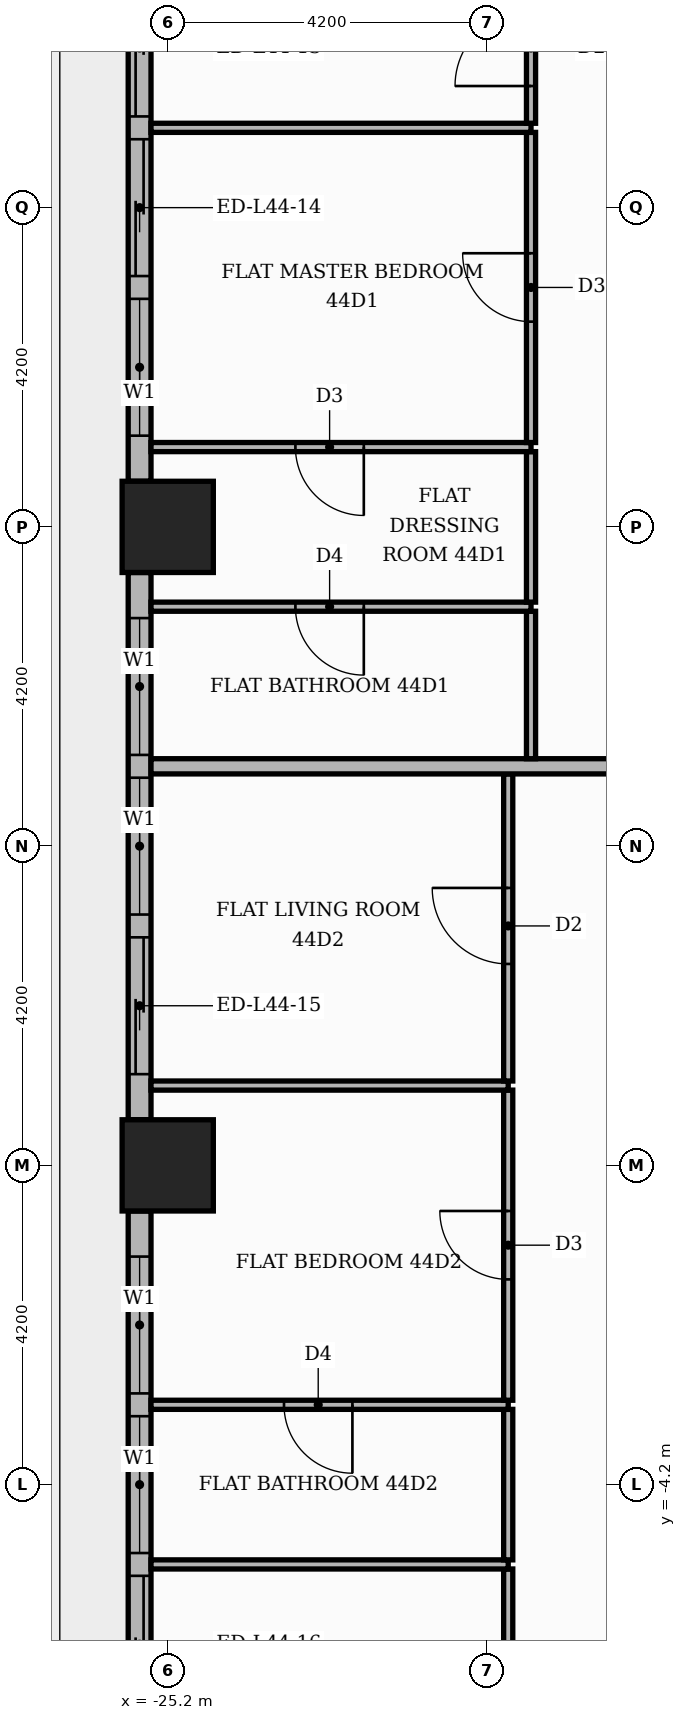
"""IFC4 building model, lengths in metres.
Left out: names, types, materials, properties, quantities, classifications, styles, units other than length and angle.
Written with IfcOpenShell. Run it as: python <this file> out.ifc"""

import sys

from ifc_helpers import new_model, si_unit, direction, frame, frame_2d, origin, origin_2d, place, context, subcontext, project, spatial, rectangle, extrude, element, fill, save


model = new_model("IFC4")
c1 = context("Model", 3, precision=1e-05, world=origin(), true_north=direction((0.0, 1.0)))
c2 = subcontext(c1, "Body", "Model", "MODEL_VIEW")
j1 = project(units=[si_unit("LENGTHUNIT", "METRE"), si_unit("PLANEANGLEUNIT", "RADIAN")], contexts=[c1])
p1 = place(None, origin())
s1 = spatial("IfcSite", under=j1, at=p1, CompositionType="ELEMENT")
p2 = place(p1, origin())
s2 = spatial("IfcBuilding", under=s1, at=p2, CompositionType="ELEMENT")
p3 = place(p2, frame((0.0, 0.0, 188.4)))
s3 = spatial("IfcBuildingStorey", under=s2, at=p3, CompositionType="ELEMENT", Elevation=188.4)
for number, where, z_axis, x_axis in (
    (1, (-25.2, 0.0, 0.0), (0.0, 0.0, 1.0), (1.0, 0.0, 0.0)),
    (2, (-25.2, 8.4, 0.0), (0.0, 0.0, 1.0), (1.0, 0.0, 0.0)),
):
    element("IfcColumn", number, at=place(p3, frame(where, z_axis=z_axis, x_axis=x_axis)), inside=s3, PredefinedType="COLUMN", context=c2, shape_type="SweptSolid", body=[
        extrude(rectangle(XDim=1.2, YDim=1.2, at=origin_2d()), origin(), (0.0, 0.0, 1.0), 3.9),
    ])
p4 = place(p3, frame((-25.57, 16.2, 0.0), z_axis=(0.0, 0.0, 1.0), x_axis=(0.0, -1.0, 0.0)))
e3 = element("IfcWall", 3, at=p4, inside=s3, PredefinedType="STANDARD", context=c2, shape_type="SweptSolid", body=[
    extrude(rectangle(XDim=7.2, YDim=0.3, at=frame_2d((3.6, 0.0))), origin(), (0.0, 0.0, 1.0), 3.48),
])
p5 = place(p4, frame((0.6, 0.0, 0.0)))
e4 = element("IfcOpeningElement", 4, at=p5, cuts=e3, PredefinedType="OPENING", context=c2, shape_type="SweptSolid", body=[
    extrude(rectangle(XDim=1.8, YDim=2.4, at=frame_2d((0.9, 1.2))), frame((0.0, 0.16, 0.0), z_axis=(0.0, -1.0, 0.0), x_axis=(1.0, 0.0, 0.0)), (0.0, 0.0, 1.0), 0.32),
])
p6 = place(p4, frame((2.7, 0.0, 0.0)))
e5 = element("IfcOpeningElement", 5, at=p6, cuts=e3, PredefinedType="OPENING", context=c2, shape_type="SweptSolid", body=[
    extrude(rectangle(XDim=1.8, YDim=2.4, at=frame_2d((0.9, 1.2))), frame((0.0, 0.16, 0.0), z_axis=(0.0, -1.0, 0.0), x_axis=(1.0, 0.0, 0.0)), (0.0, 0.0, 1.0), 0.32),
])
p7 = place(p4, frame((4.8, 0.0, 0.9)))
e6 = element("IfcOpeningElement", 6, at=p7, cuts=e3, PredefinedType="OPENING", context=c2, shape_type="SweptSolid", body=[
    extrude(rectangle(XDim=1.8, YDim=2.1, at=frame_2d((0.9, 1.05))), frame((0.0, 0.16, 0.0), z_axis=(0.0, -1.0, 0.0), x_axis=(1.0, 0.0, 0.0)), (0.0, 0.0, 1.0), 0.32),
])
p8 = place(p3, frame((-25.57, 7.8, 0.0), z_axis=(0.0, 0.0, 1.0), x_axis=(0.0, -1.0, 0.0)))
e7 = element("IfcWall", 7, at=p8, inside=s3, PredefinedType="STANDARD", context=c2, shape_type="SweptSolid", body=[
    extrude(rectangle(XDim=7.2, YDim=0.3, at=frame_2d((3.6, 0.0))), origin(), (0.0, 0.0, 1.0), 3.48),
])
p9 = place(p8, frame((0.6, 0.0, 0.9)))
e8 = element("IfcOpeningElement", 8, at=p9, cuts=e7, PredefinedType="OPENING", context=c2, shape_type="SweptSolid", body=[
    extrude(rectangle(XDim=1.8, YDim=2.1, at=frame_2d((0.9, 1.05))), frame((0.0, 0.16, 0.0), z_axis=(0.0, -1.0, 0.0), x_axis=(1.0, 0.0, 0.0)), (0.0, 0.0, 1.0), 0.32),
])
p10 = place(p8, frame((2.7, 0.0, 0.9)))
e9 = element("IfcOpeningElement", 9, at=p10, cuts=e7, PredefinedType="OPENING", context=c2, shape_type="SweptSolid", body=[
    extrude(rectangle(XDim=1.8, YDim=2.1, at=frame_2d((0.9, 1.05))), frame((0.0, 0.16, 0.0), z_axis=(0.0, -1.0, 0.0), x_axis=(1.0, 0.0, 0.0)), (0.0, 0.0, 1.0), 0.32),
])
p11 = place(p8, frame((4.8, 0.0, 0.0)))
e10 = element("IfcOpeningElement", 10, at=p11, cuts=e7, PredefinedType="OPENING", context=c2, shape_type="SweptSolid", body=[
    extrude(rectangle(XDim=1.8, YDim=2.4, at=frame_2d((0.9, 1.2))), frame((0.0, 0.16, 0.0), z_axis=(0.0, -1.0, 0.0), x_axis=(1.0, 0.0, 0.0)), (0.0, 0.0, 1.0), 0.32),
])
p12 = place(p3, frame((-25.57, -0.6, 0.0), z_axis=(0.0, 0.0, 1.0), x_axis=(0.0, -1.0, 0.0)))
e11 = element("IfcWall", 11, at=p12, inside=s3, PredefinedType="STANDARD", context=c2, shape_type="SweptSolid", body=[
    extrude(rectangle(XDim=7.2, YDim=0.3, at=frame_2d((3.6, 0.0))), origin(), (0.0, 0.0, 1.0), 3.48),
])
p13 = place(p12, frame((0.6, 0.0, 0.9)))
e12 = element("IfcOpeningElement", 12, at=p13, cuts=e11, PredefinedType="OPENING", context=c2, shape_type="SweptSolid", body=[
    extrude(rectangle(XDim=1.8, YDim=2.1, at=frame_2d((0.9, 1.05))), frame((0.0, 0.16, 0.0), z_axis=(0.0, -1.0, 0.0), x_axis=(1.0, 0.0, 0.0)), (0.0, 0.0, 1.0), 0.32),
])
p14 = place(p12, frame((2.7, 0.0, 0.9)))
e13 = element("IfcOpeningElement", 13, at=p14, cuts=e11, PredefinedType="OPENING", context=c2, shape_type="SweptSolid", body=[
    extrude(rectangle(XDim=1.8, YDim=2.1, at=frame_2d((0.9, 1.05))), frame((0.0, 0.16, 0.0), z_axis=(0.0, -1.0, 0.0), x_axis=(1.0, 0.0, 0.0)), (0.0, 0.0, 1.0), 0.32),
])
p15 = place(p12, frame((4.8, 0.0, 0.0)))
e14 = element("IfcOpeningElement", 14, at=p15, cuts=e11, PredefinedType="OPENING", context=c2, shape_type="SweptSolid", body=[
    extrude(rectangle(XDim=1.8, YDim=2.4, at=frame_2d((0.9, 1.2))), frame((0.0, 0.16, 0.0), z_axis=(0.0, -1.0, 0.0), x_axis=(1.0, 0.0, 0.0)), (0.0, 0.0, 1.0), 0.32),
])
p16 = place(p3, frame((-20.72, -9.39, 0.0), z_axis=(0.0, 0.0, 1.0), x_axis=(0.0, 1.0, 0.0)))
e15 = element("IfcWall", 15, at=p16, inside=s3, PredefinedType="PARTITIONING", context=c2, shape_type="SweptSolid", body=[
    extrude(rectangle(XDim=4.08, YDim=0.12, at=frame_2d((2.04, 0.0))), origin(), (0.0, 0.0, 1.0), 3.48),
])
p17 = place(p16, frame((1.59, 0.0, 0.0)))
e16 = element("IfcOpeningElement", 16, at=p17, cuts=e15, PredefinedType="OPENING", context=c2, shape_type="SweptSolid", body=[
    extrude(rectangle(XDim=0.9, YDim=2.1, at=frame_2d((0.45, 1.05))), frame((0.0, 0.07, 0.0), z_axis=(0.0, -1.0, 0.0), x_axis=(1.0, 0.0, 0.0)), (0.0, 0.0, 1.0), 0.14),
])
p18 = place(p3, frame((-25.42, -5.25, 0.0), z_axis=(0.0, 0.0, 1.0), x_axis=(1.0, 0.0, 0.0)))
e17 = element("IfcWall", 17, at=p18, inside=s3, PredefinedType="PARTITIONING", context=c2, shape_type="SweptSolid", body=[
    extrude(rectangle(XDim=4.7, YDim=0.12, at=frame_2d((2.35, 0.0))), origin(), (0.0, 0.0, 1.0), 3.48),
])
p19 = place(p3, frame((-20.72, -5.19, 0.0), z_axis=(0.0, 0.0, 1.0), x_axis=(0.0, 1.0, 0.0)))
e18 = element("IfcWall", 18, at=p19, inside=s3, PredefinedType="PARTITIONING", context=c2, shape_type="SweptSolid", body=[
    extrude(rectangle(XDim=1.98, YDim=0.12, at=frame_2d((0.99, 0.0))), origin(), (0.0, 0.0, 1.0), 3.48),
])
p20 = place(p3, frame((-25.42, -3.15, 0.0), z_axis=(0.0, 0.0, 1.0), x_axis=(1.0, 0.0, 0.0)))
e19 = element("IfcWall", 19, at=p20, inside=s3, PredefinedType="PARTITIONING", context=c2, shape_type="SweptSolid", body=[
    extrude(rectangle(XDim=4.7, YDim=0.12, at=frame_2d((2.35, 0.0))), origin(), (0.0, 0.0, 1.0), 3.48),
])
p21 = place(p20, frame((1.75, 0.0, 0.0)))
e20 = element("IfcOpeningElement", 20, at=p21, cuts=e19, PredefinedType="OPENING", context=c2, shape_type="SweptSolid", body=[
    extrude(rectangle(XDim=0.9, YDim=2.1, at=frame_2d((0.45, 1.05))), frame((0.0, 0.07, 0.0), z_axis=(0.0, -1.0, 0.0), x_axis=(1.0, 0.0, 0.0)), (0.0, 0.0, 1.0), 0.14),
])
p22 = place(p3, frame((-20.72, -3.09, 0.0), z_axis=(0.0, 0.0, 1.0), x_axis=(0.0, 1.0, 0.0)))
e21 = element("IfcWall", 21, at=p22, inside=s3, PredefinedType="PARTITIONING", context=c2, shape_type="SweptSolid", body=[
    extrude(rectangle(XDim=4.08, YDim=0.12, at=frame_2d((2.04, 0.0))), origin(), (0.0, 0.0, 1.0), 3.48),
])
p23 = place(p22, frame((1.59, 0.0, 0.0)))
e22 = element("IfcOpeningElement", 22, at=p23, cuts=e21, PredefinedType="OPENING", context=c2, shape_type="SweptSolid", body=[
    extrude(rectangle(XDim=0.9, YDim=2.1, at=frame_2d((0.45, 1.05))), frame((0.0, 0.07, 0.0), z_axis=(0.0, -1.0, 0.0), x_axis=(1.0, 0.0, 0.0)), (0.0, 0.0, 1.0), 0.14),
])
p24 = place(p3, frame((-25.42, 1.05, 0.0), z_axis=(0.0, 0.0, 1.0), x_axis=(1.0, 0.0, 0.0)))
e23 = element("IfcWall", 23, at=p24, inside=s3, PredefinedType="PARTITIONING", context=c2, shape_type="SweptSolid", body=[
    extrude(rectangle(XDim=4.7, YDim=0.12, at=frame_2d((2.35, 0.0))), origin(), (0.0, 0.0, 1.0), 3.48),
])
p25 = place(p3, frame((-20.72, 1.11, 0.0), z_axis=(0.0, 0.0, 1.0), x_axis=(0.0, 1.0, 0.0)))
e24 = element("IfcWall", 24, at=p25, inside=s3, PredefinedType="PARTITIONING", context=c2, shape_type="SweptSolid", body=[
    extrude(rectangle(XDim=4.04, YDim=0.12, at=frame_2d((2.02, 0.0))), origin(), (0.0, 0.0, 1.0), 3.48),
])
p26 = place(p25, frame((1.54, 0.0, 0.0)))
e25 = element("IfcOpeningElement", 25, at=p26, cuts=e24, PredefinedType="OPENING", context=c2, shape_type="SweptSolid", body=[
    extrude(rectangle(XDim=1.0, YDim=2.1, at=frame_2d((0.5, 1.05))), frame((0.0, 0.07, 0.0), z_axis=(0.0, -1.0, 0.0), x_axis=(1.0, 0.0, 0.0)), (0.0, 0.0, 1.0), 0.14),
])
p27 = place(p3, frame((-25.42, 5.25, 0.0), z_axis=(0.0, 0.0, 1.0), x_axis=(1.0, 0.0, 0.0)))
e26 = element("IfcWall", 26, at=p27, inside=s3, PredefinedType="PARTITIONING", context=c2, shape_type="SweptSolid", body=[
    extrude(rectangle(XDim=11.77, YDim=0.2, at=frame_2d((5.885, 0.0))), origin(), (0.0, 0.0, 1.0), 3.48),
])
p28 = place(p3, frame((-20.42, 5.35, 0.0), z_axis=(0.0, 0.0, 1.0), x_axis=(0.0, 1.0, 0.0)))
e27 = element("IfcWall", 27, at=p28, inside=s3, PredefinedType="PARTITIONING", context=c2, shape_type="SweptSolid", body=[
    extrude(rectangle(XDim=1.94, YDim=0.12, at=frame_2d((0.97, 0.0))), origin(), (0.0, 0.0, 1.0), 3.48),
])
p29 = place(p3, frame((-25.42, 7.35, 0.0), z_axis=(0.0, 0.0, 1.0), x_axis=(1.0, 0.0, 0.0)))
e28 = element("IfcWall", 28, at=p29, inside=s3, PredefinedType="PARTITIONING", context=c2, shape_type="SweptSolid", body=[
    extrude(rectangle(XDim=5.0, YDim=0.12, at=frame_2d((2.5, 0.0))), origin(), (0.0, 0.0, 1.0), 3.48),
])
p30 = place(p29, frame((1.9, 0.0, 0.0)))
e29 = element("IfcOpeningElement", 29, at=p30, cuts=e28, PredefinedType="OPENING", context=c2, shape_type="SweptSolid", body=[
    extrude(rectangle(XDim=0.9, YDim=2.1, at=frame_2d((0.45, 1.05))), frame((0.0, 0.07, 0.0), z_axis=(0.0, -1.0, 0.0), x_axis=(1.0, 0.0, 0.0)), (0.0, 0.0, 1.0), 0.14),
])
p31 = place(p3, frame((-20.42, 7.41, 0.0), z_axis=(0.0, 0.0, 1.0), x_axis=(0.0, 1.0, 0.0)))
e30 = element("IfcWall", 30, at=p31, inside=s3, PredefinedType="PARTITIONING", context=c2, shape_type="SweptSolid", body=[
    extrude(rectangle(XDim=1.98, YDim=0.12, at=frame_2d((0.99, 0.0))), origin(), (0.0, 0.0, 1.0), 3.48),
])
p32 = place(p3, frame((-25.42, 9.45, 0.0), z_axis=(0.0, 0.0, 1.0), x_axis=(1.0, 0.0, 0.0)))
e31 = element("IfcWall", 31, at=p32, inside=s3, PredefinedType="PARTITIONING", context=c2, shape_type="SweptSolid", body=[
    extrude(rectangle(XDim=5.0, YDim=0.12, at=frame_2d((2.5, 0.0))), origin(), (0.0, 0.0, 1.0), 3.48),
])
p33 = place(p32, frame((1.9, 0.0, 0.0)))
e32 = element("IfcOpeningElement", 32, at=p33, cuts=e31, PredefinedType="OPENING", context=c2, shape_type="SweptSolid", body=[
    extrude(rectangle(XDim=0.9, YDim=2.1, at=frame_2d((0.45, 1.05))), frame((0.0, 0.07, 0.0), z_axis=(0.0, -1.0, 0.0), x_axis=(1.0, 0.0, 0.0)), (0.0, 0.0, 1.0), 0.14),
])
p34 = place(p3, frame((-20.42, 9.51, 0.0), z_axis=(0.0, 0.0, 1.0), x_axis=(0.0, 1.0, 0.0)))
e33 = element("IfcWall", 33, at=p34, inside=s3, PredefinedType="PARTITIONING", context=c2, shape_type="SweptSolid", body=[
    extrude(rectangle(XDim=4.08, YDim=0.12, at=frame_2d((2.04, 0.0))), origin(), (0.0, 0.0, 1.0), 3.48),
])
p35 = place(p34, frame((1.59, 0.0, 0.0)))
e34 = element("IfcOpeningElement", 34, at=p35, cuts=e33, PredefinedType="OPENING", context=c2, shape_type="SweptSolid", body=[
    extrude(rectangle(XDim=0.9, YDim=2.1, at=frame_2d((0.45, 1.05))), frame((0.0, 0.07, 0.0), z_axis=(0.0, -1.0, 0.0), x_axis=(1.0, 0.0, 0.0)), (0.0, 0.0, 1.0), 0.14),
])
p36 = place(p3, frame((-25.42, 13.65, 0.0), z_axis=(0.0, 0.0, 1.0), x_axis=(1.0, 0.0, 0.0)))
e35 = element("IfcWall", 35, at=p36, inside=s3, PredefinedType="PARTITIONING", context=c2, shape_type="SweptSolid", body=[
    extrude(rectangle(XDim=5.0, YDim=0.12, at=frame_2d((2.5, 0.0))), origin(), (0.0, 0.0, 1.0), 3.48),
])
p37 = place(p3, frame((-20.42, 13.71, 0.0), z_axis=(0.0, 0.0, 1.0), x_axis=(0.0, 1.0, 0.0)))
e36 = element("IfcWall", 36, at=p37, inside=s3, PredefinedType="PARTITIONING", context=c2, shape_type="SweptSolid", body=[
    extrude(rectangle(XDim=1.98, YDim=0.12, at=frame_2d((0.99, 0.0))), origin(), (0.0, 0.0, 1.0), 3.48),
])
p38 = place(p37, frame((0.49, 0.0, 0.0)))
e37 = element("IfcOpeningElement", 37, at=p38, cuts=e36, PredefinedType="OPENING", context=c2, shape_type="SweptSolid", body=[
    extrude(rectangle(XDim=1.0, YDim=2.1, at=frame_2d((0.5, 1.05))), frame((0.0, 0.07, 0.0), z_axis=(0.0, -1.0, 0.0), x_axis=(1.0, 0.0, 0.0)), (0.0, 0.0, 1.0), 0.14),
])
p39 = place(p5, origin())
e38 = element("IfcDoor", 38, at=p39, inside=s3, OperationType="SLIDING_TO_LEFT", PredefinedType="DOOR", context=c2, shape_type="SweptSolid", body=[
    extrude(rectangle(XDim=1.8, YDim=2.4, at=frame_2d((0.9, 1.2))), frame((0.0, 0.025, 0.0), z_axis=(0.0, -1.0, 0.0), x_axis=(1.0, 0.0, 0.0)), (0.0, 0.0, 1.0), 0.05),
])
fill(e4, e38)
p40 = place(p6, origin())
e39 = element("IfcDoor", 39, at=p40, inside=s3, OperationType="SLIDING_TO_RIGHT", PredefinedType="DOOR", context=c2, shape_type="SweptSolid", body=[
    extrude(rectangle(XDim=1.8, YDim=2.4, at=frame_2d((0.9, 1.2))), frame((0.0, 0.025, 0.0), z_axis=(0.0, -1.0, 0.0), x_axis=(1.0, 0.0, 0.0)), (0.0, 0.0, 1.0), 0.05),
])
fill(e5, e39)
p41 = place(p7, origin())
e40 = element("IfcWindow", 40, at=p41, inside=s3, PartitioningType="SINGLE_PANEL", PredefinedType="WINDOW", context=c2, shape_type="SweptSolid", body=[
    extrude(rectangle(XDim=1.8, YDim=2.1, at=frame_2d((0.9, 1.05))), frame((0.0, 0.03, 0.0), z_axis=(0.0, -1.0, 0.0), x_axis=(1.0, 0.0, 0.0)), (0.0, 0.0, 1.0), 0.06),
])
fill(e6, e40)
p42 = place(p9, origin())
e41 = element("IfcWindow", 41, at=p42, inside=s3, PartitioningType="SINGLE_PANEL", PredefinedType="WINDOW", context=c2, shape_type="SweptSolid", body=[
    extrude(rectangle(XDim=1.8, YDim=2.1, at=frame_2d((0.9, 1.05))), frame((0.0, 0.03, 0.0), z_axis=(0.0, -1.0, 0.0), x_axis=(1.0, 0.0, 0.0)), (0.0, 0.0, 1.0), 0.06),
])
fill(e8, e41)
p43 = place(p10, origin())
e42 = element("IfcWindow", 42, at=p43, inside=s3, PartitioningType="SINGLE_PANEL", PredefinedType="WINDOW", context=c2, shape_type="SweptSolid", body=[
    extrude(rectangle(XDim=1.8, YDim=2.1, at=frame_2d((0.9, 1.05))), frame((0.0, 0.03, 0.0), z_axis=(0.0, -1.0, 0.0), x_axis=(1.0, 0.0, 0.0)), (0.0, 0.0, 1.0), 0.06),
])
fill(e9, e42)
p44 = place(p11, origin())
e43 = element("IfcDoor", 43, at=p44, inside=s3, OperationType="SLIDING_TO_RIGHT", PredefinedType="DOOR", context=c2, shape_type="SweptSolid", body=[
    extrude(rectangle(XDim=1.8, YDim=2.4, at=frame_2d((0.9, 1.2))), frame((0.0, 0.025, 0.0), z_axis=(0.0, -1.0, 0.0), x_axis=(1.0, 0.0, 0.0)), (0.0, 0.0, 1.0), 0.05),
])
fill(e10, e43)
p45 = place(p13, origin())
e44 = element("IfcWindow", 44, at=p45, inside=s3, PartitioningType="SINGLE_PANEL", PredefinedType="WINDOW", context=c2, shape_type="SweptSolid", body=[
    extrude(rectangle(XDim=1.8, YDim=2.1, at=frame_2d((0.9, 1.05))), frame((0.0, 0.03, 0.0), z_axis=(0.0, -1.0, 0.0), x_axis=(1.0, 0.0, 0.0)), (0.0, 0.0, 1.0), 0.06),
])
fill(e12, e44)
p46 = place(p14, origin())
e45 = element("IfcWindow", 45, at=p46, inside=s3, PartitioningType="SINGLE_PANEL", PredefinedType="WINDOW", context=c2, shape_type="SweptSolid", body=[
    extrude(rectangle(XDim=1.8, YDim=2.1, at=frame_2d((0.9, 1.05))), frame((0.0, 0.03, 0.0), z_axis=(0.0, -1.0, 0.0), x_axis=(1.0, 0.0, 0.0)), (0.0, 0.0, 1.0), 0.06),
])
fill(e13, e45)
p47 = place(p15, origin())
e46 = element("IfcDoor", 46, at=p47, inside=s3, OperationType="SLIDING_TO_RIGHT", PredefinedType="DOOR", context=c2, shape_type="SweptSolid", body=[
    extrude(rectangle(XDim=1.8, YDim=2.4, at=frame_2d((0.9, 1.2))), frame((0.0, 0.025, 0.0), z_axis=(0.0, -1.0, 0.0), x_axis=(1.0, 0.0, 0.0)), (0.0, 0.0, 1.0), 0.05),
])
fill(e14, e46)
p48 = place(p38, origin())
e47 = element("IfcDoor", 47, at=p48, inside=s3, OperationType="SINGLE_SWING_LEFT", PredefinedType="DOOR", context=c2, shape_type="SweptSolid", body=[
    extrude(rectangle(XDim=1.0, YDim=2.1, at=frame_2d((0.5, 1.05))), frame((0.0, 0.025, 0.0), z_axis=(0.0, -1.0, 0.0), x_axis=(1.0, 0.0, 0.0)), (0.0, 0.0, 1.0), 0.05),
])
fill(e37, e47)
p49 = place(p35, origin())
e48 = element("IfcDoor", 48, at=p49, inside=s3, OperationType="SINGLE_SWING_RIGHT", PredefinedType="DOOR", context=c2, shape_type="SweptSolid", body=[
    extrude(rectangle(XDim=0.9, YDim=2.1, at=frame_2d((0.45, 1.05))), frame((0.0, 0.025, 0.0), z_axis=(0.0, -1.0, 0.0), x_axis=(1.0, 0.0, 0.0)), (0.0, 0.0, 1.0), 0.05),
])
fill(e34, e48)
p50 = place(p33, frame((0.9, 0.0, 0.0), z_axis=(0.0, 0.0, 1.0), x_axis=(-1.0, 0.0, 0.0)))
e49 = element("IfcDoor", 49, at=p50, inside=s3, OperationType="SINGLE_SWING_RIGHT", PredefinedType="DOOR", context=c2, shape_type="SweptSolid", body=[
    extrude(rectangle(XDim=0.9, YDim=2.1, at=frame_2d((0.45, 1.05))), frame((0.0, 0.025, 0.0), z_axis=(0.0, -1.0, 0.0), x_axis=(1.0, 0.0, 0.0)), (0.0, 0.0, 1.0), 0.05),
])
fill(e32, e49)
p51 = place(p30, frame((0.9, 0.0, 0.0), z_axis=(0.0, 0.0, 1.0), x_axis=(-1.0, 0.0, 0.0)))
e50 = element("IfcDoor", 50, at=p51, inside=s3, OperationType="SINGLE_SWING_RIGHT", PredefinedType="DOOR", context=c2, shape_type="SweptSolid", body=[
    extrude(rectangle(XDim=0.9, YDim=2.1, at=frame_2d((0.45, 1.05))), frame((0.0, 0.025, 0.0), z_axis=(0.0, -1.0, 0.0), x_axis=(1.0, 0.0, 0.0)), (0.0, 0.0, 1.0), 0.05),
])
fill(e29, e50)
p52 = place(p26, origin())
e51 = element("IfcDoor", 51, at=p52, inside=s3, OperationType="SINGLE_SWING_RIGHT", PredefinedType="DOOR", context=c2, shape_type="SweptSolid", body=[
    extrude(rectangle(XDim=1.0, YDim=2.1, at=frame_2d((0.5, 1.05))), frame((0.0, 0.025, 0.0), z_axis=(0.0, -1.0, 0.0), x_axis=(1.0, 0.0, 0.0)), (0.0, 0.0, 1.0), 0.05),
])
fill(e25, e51)
p53 = place(p23, origin())
e52 = element("IfcDoor", 52, at=p53, inside=s3, OperationType="SINGLE_SWING_RIGHT", PredefinedType="DOOR", context=c2, shape_type="SweptSolid", body=[
    extrude(rectangle(XDim=0.9, YDim=2.1, at=frame_2d((0.45, 1.05))), frame((0.0, 0.025, 0.0), z_axis=(0.0, -1.0, 0.0), x_axis=(1.0, 0.0, 0.0)), (0.0, 0.0, 1.0), 0.05),
])
fill(e22, e52)
p54 = place(p21, frame((0.9, 0.0, 0.0), z_axis=(0.0, 0.0, 1.0), x_axis=(-1.0, 0.0, 0.0)))
e53 = element("IfcDoor", 53, at=p54, inside=s3, OperationType="SINGLE_SWING_RIGHT", PredefinedType="DOOR", context=c2, shape_type="SweptSolid", body=[
    extrude(rectangle(XDim=0.9, YDim=2.1, at=frame_2d((0.45, 1.05))), frame((0.0, 0.025, 0.0), z_axis=(0.0, -1.0, 0.0), x_axis=(1.0, 0.0, 0.0)), (0.0, 0.0, 1.0), 0.05),
])
fill(e20, e53)
save(model, sys.argv[1])
